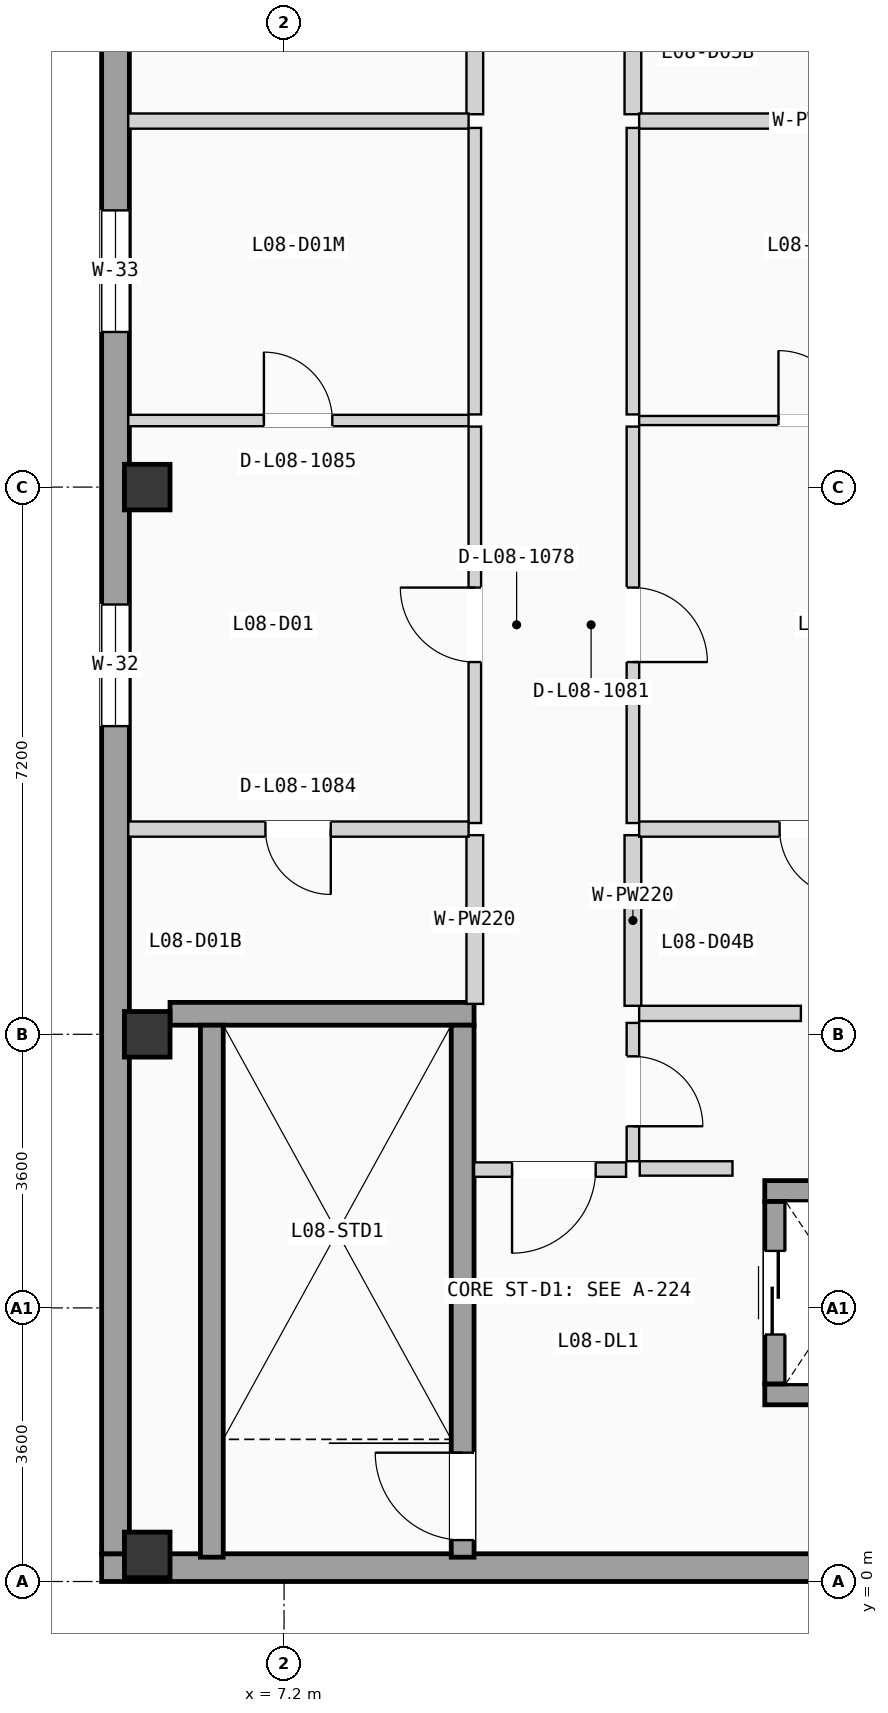
"""IFC4 building model, lengths in metres.
Left out: names, types, materials, properties, quantities, classifications, styles, units other than length and angle.
Written with IfcOpenShell. Run it as: python <this file> out.ifc"""

import sys

from ifc_helpers import new_model, si_unit, direction, frame, frame_2d, origin, origin_2d, place, context, subcontext, project, spatial, rectangle, extrude, element, fill, save


model = new_model("IFC4")
c1 = context("Model", 3, precision=1e-05, world=origin(), true_north=direction((0.0, 1.0)))
c2 = subcontext(c1, "Body", "Model", "MODEL_VIEW")
j1 = project(units=[si_unit("LENGTHUNIT", "METRE"), si_unit("PLANEANGLEUNIT", "RADIAN")], contexts=[c1])
p1 = place(None, origin())
s1 = spatial("IfcSite", under=j1, at=p1, CompositionType="ELEMENT")
p2 = place(p1, origin())
s2 = spatial("IfcBuilding", under=s1, at=p2, CompositionType="ELEMENT")
p3 = place(p2, frame((0.0, 0.0, 27.825)))
s3 = spatial("IfcBuildingStorey", under=s2, at=p3, CompositionType="ELEMENT", Elevation=27.825)
for number, where, z_axis, x_axis in (
    (1, (5.4, 0.35, 0.0), (0.0, 0.0, 1.0), (1.0, 0.0, 0.0)),
    (2, (5.4, 7.2, 0.0), (0.0, 0.0, 1.0), (1.0, 0.0, 0.0)),
    (3, (5.4, 14.4, 0.0), (0.0, 0.0, 1.0), (1.0, 0.0, 0.0)),
):
    element("IfcColumn", number, at=place(p3, frame(where, z_axis=z_axis, x_axis=x_axis)), inside=s3, PredefinedType="COLUMN", context=c2, shape_type="SweptSolid", body=[
        extrude(rectangle(XDim=0.6, YDim=0.6, at=origin_2d()), origin(), (0.0, 0.0, 1.0), 2.85),
    ])
p4 = place(p3, frame((4.8, 0.183, 0.0), z_axis=(0.0, 0.0, 1.0), x_axis=(1.0, 0.0, 0.0)))
e4 = element("IfcWall", 4, at=p4, inside=s3, PredefinedType="SOLIDWALL", context=c2, shape_type="SweptSolid", body=[
    extrude(rectangle(XDim=12.0, YDim=0.365, at=frame_2d((6.0, 0.0))), origin(), (0.0, 0.0, 1.0), 2.55),
])
p5 = place(p3, frame((4.982, 0.365, 0.0), z_axis=(0.0, 0.0, 1.0), x_axis=(0.0, 1.0, 0.0)))
e5 = element("IfcWall", 5, at=p5, inside=s3, PredefinedType="SOLIDWALL", context=c2, shape_type="SweptSolid", body=[
    extrude(rectangle(XDim=49.67, YDim=0.365, at=frame_2d((24.835, 0.0))), origin(), (0.0, 0.0, 1.0), 2.55),
])
p6 = place(p5, frame((10.89, 0.0, 0.75)))
e6 = element("IfcOpeningElement", 6, at=p6, cuts=e5, PredefinedType="OPENING", context=c2, shape_type="SweptSolid", body=[
    extrude(rectangle(XDim=1.6, YDim=1.35, at=frame_2d((0.8, 0.675))), frame((0.0, 0.192, 0.0), z_axis=(0.0, -1.0, 0.0), x_axis=(1.0, 0.0, 0.0)), (0.0, 0.0, 1.0), 0.385),
])
p7 = place(p5, frame((16.076, 0.0, 0.665)))
e7 = element("IfcOpeningElement", 7, at=p7, cuts=e5, PredefinedType="OPENING", context=c2, shape_type="SweptSolid", body=[
    extrude(rectangle(XDim=1.6, YDim=1.5, at=frame_2d((0.8, 0.75))), frame((0.0, 0.192, 0.0), z_axis=(0.0, -1.0, 0.0), x_axis=(1.0, 0.0, 0.0)), (0.0, 0.0, 1.0), 0.385),
])
p8 = place(p5, frame((23.352, 0.0, 0.515)))
e8 = element("IfcOpeningElement", 8, at=p8, cuts=e5, PredefinedType="OPENING", context=c2, shape_type="SweptSolid", body=[
    extrude(rectangle(XDim=1.6, YDim=1.65, at=frame_2d((0.8, 0.825))), frame((0.0, 0.192, 0.0), z_axis=(0.0, -1.0, 0.0), x_axis=(1.0, 0.0, 0.0)), (0.0, 0.0, 1.0), 0.385),
])
p9 = place(p5, frame((36.73, 0.0, 0.85)))
e9 = element("IfcOpeningElement", 9, at=p9, cuts=e5, PredefinedType="OPENING", context=c2, shape_type="SweptSolid", body=[
    extrude(rectangle(XDim=0.95, YDim=1.2, at=frame_2d((0.475, 0.6))), frame((0.0, 0.192, 0.0), z_axis=(0.0, -1.0, 0.0), x_axis=(1.0, 0.0, 0.0)), (0.0, 0.0, 1.0), 0.385),
])
p10 = place(p5, frame((39.69, 0.0, 0.75)))
e10 = element("IfcOpeningElement", 10, at=p10, cuts=e5, PredefinedType="OPENING", context=c2, shape_type="SweptSolid", body=[
    extrude(rectangle(XDim=1.72, YDim=1.2, at=frame_2d((0.86, 0.6))), frame((0.0, 0.192, 0.0), z_axis=(0.0, -1.0, 0.0), x_axis=(1.0, 0.0, 0.0)), (0.0, 0.0, 1.0), 0.385),
])
p11 = place(p3, frame((5.7, 7.47, 0.0), z_axis=(0.0, 0.0, 1.0), x_axis=(1.0, 0.0, 0.0)))
e11 = element("IfcWall", 11, at=p11, inside=s3, PredefinedType="SHEAR", context=c2, shape_type="SweptSolid", body=[
    extrude(rectangle(XDim=4.0, YDim=0.3, at=frame_2d((2.0, 0.0))), origin(), (0.0, 0.0, 1.0), 2.55),
])
p12 = place(p3, frame((6.25, 0.32, 0.0), z_axis=(0.0, 0.0, 1.0), x_axis=(0.0, 1.0, 0.0)))
e12 = element("IfcWall", 12, at=p12, inside=s3, PredefinedType="SHEAR", context=c2, shape_type="SweptSolid", body=[
    extrude(rectangle(XDim=7.0, YDim=0.3, at=frame_2d((3.5, 0.0))), origin(), (0.0, 0.0, 1.0), 2.55),
])
p13 = place(p3, frame((9.55, 0.32, 0.0), z_axis=(0.0, 0.0, 1.0), x_axis=(0.0, 1.0, 0.0)))
e13 = element("IfcWall", 13, at=p13, inside=s3, PredefinedType="SHEAR", context=c2, shape_type="SweptSolid", body=[
    extrude(rectangle(XDim=7.0, YDim=0.3, at=frame_2d((3.5, 0.0))), origin(), (0.0, 0.0, 1.0), 2.55),
])
p14 = place(p13, frame((0.225, 0.0, 0.0)))
e14 = element("IfcOpeningElement", 14, at=p14, cuts=e13, PredefinedType="OPENING", context=c2, shape_type="SweptSolid", body=[
    extrude(rectangle(XDim=1.15, YDim=2.12, at=frame_2d((0.575, 1.06))), frame((0.0, 0.16, 0.0), z_axis=(0.0, -1.0, 0.0), x_axis=(1.0, 0.0, 0.0)), (0.0, 0.0, 1.0), 0.32),
])
for number, where, z_axis, x_axis in (
    (15, (13.525, 2.462, 0.0), (0.0, 0.0, 1.0), (1.0, 0.0, 0.0)),
    (16, (13.525, 5.137, 0.0), (0.0, 0.0, 1.0), (1.0, 0.0, 0.0)),
):
    element("IfcWall", number, at=place(p3, frame(where, z_axis=z_axis, x_axis=x_axis)), inside=s3, PredefinedType="SHEAR", context=c2, shape_type="SweptSolid", body=[
        extrude(rectangle(XDim=2.15, YDim=0.275, at=frame_2d((1.075, 0.0))), origin(), (0.0, 0.0, 1.0), 2.55),
    ])
p15 = place(p3, frame((13.663, 2.6, 0.0), z_axis=(0.0, 0.0, 1.0), x_axis=(0.0, 1.0, 0.0)))
e17 = element("IfcWall", 17, at=p15, inside=s3, PredefinedType="SHEAR", context=c2, shape_type="SweptSolid", body=[
    extrude(rectangle(XDim=2.4, YDim=0.275, at=frame_2d((1.2, 0.0))), origin(), (0.0, 0.0, 1.0), 2.55),
])
p16 = place(p15, frame((0.65, 0.0, 0.0)))
e18 = element("IfcOpeningElement", 18, at=p16, cuts=e17, PredefinedType="OPENING", context=c2, shape_type="SweptSolid", body=[
    extrude(rectangle(XDim=1.1, YDim=2.15, at=frame_2d((0.55, 1.075))), frame((0.0, 0.147, 0.0), z_axis=(0.0, -1.0, 0.0), x_axis=(1.0, 0.0, 0.0)), (0.0, 0.0, 1.0), 0.295),
])
p17 = place(p3, frame((11.88, 5.435, 0.0), z_axis=(0.0, 0.0, 1.0), x_axis=(1.0, 0.0, 0.0)))
e19 = element("IfcWall", 19, at=p17, inside=s3, PredefinedType="PARTITIONING", context=c2, shape_type="SweptSolid", body=[
    extrude(rectangle(XDim=1.22, YDim=0.19, at=frame_2d((0.61, 0.0))), origin(), (0.0, 0.0, 1.0), 2.39),
])
p18 = place(p3, frame((9.7, 5.42, 0.0), z_axis=(0.0, 0.0, 1.0), x_axis=(1.0, 0.0, 0.0)))
e20 = element("IfcWall", 20, at=p18, inside=s3, PredefinedType="PARTITIONING", context=c2, shape_type="SweptSolid", body=[
    extrude(rectangle(XDim=2.0, YDim=0.19, at=frame_2d((1.0, 0.0))), origin(), (0.0, 0.0, 1.0), 2.39),
])
p19 = place(p18, frame((0.5, 0.0, 0.0)))
e21 = element("IfcOpeningElement", 21, at=p19, cuts=e20, PredefinedType="OPENING", context=c2, shape_type="SweptSolid", body=[
    extrude(rectangle(XDim=1.1, YDim=2.12, at=frame_2d((0.55, 1.06))), frame((0.0, 0.105, 0.0), z_axis=(0.0, -1.0, 0.0), x_axis=(1.0, 0.0, 0.0)), (0.0, 0.0, 1.0), 0.21),
])
p20 = place(p3, frame((11.79, 5.53, 0.0), z_axis=(0.0, 0.0, 1.0), x_axis=(0.0, 1.0, 0.0)))
e22 = element("IfcWall", 22, at=p20, inside=s3, PredefinedType="PARTITIONING", context=c2, shape_type="SweptSolid", body=[
    extrude(rectangle(XDim=1.82, YDim=0.165, at=frame_2d((0.91, 0.0))), origin(), (0.0, 0.0, 1.0), 2.39),
])
p21 = place(p20, frame((0.46, 0.0, 0.0)))
e23 = element("IfcOpeningElement", 23, at=p21, cuts=e22, PredefinedType="OPENING", context=c2, shape_type="SweptSolid", body=[
    extrude(rectangle(XDim=0.92, YDim=2.04, at=frame_2d((0.46, 1.02))), frame((0.0, 0.093, 0.0), z_axis=(0.0, -1.0, 0.0), x_axis=(1.0, 0.0, 0.0)), (0.0, 0.0, 1.0), 0.185),
])
p22 = place(p3, frame((11.872, 7.475, 0.0), z_axis=(0.0, 0.0, 1.0), x_axis=(1.0, 0.0, 0.0)))
e24 = element("IfcWall", 24, at=p22, inside=s3, PredefinedType="PLUMBINGWALL", context=c2, shape_type="SweptSolid", body=[
    extrude(rectangle(XDim=2.128, YDim=0.2, at=frame_2d((1.064, 0.0))), origin(), (0.0, 0.0, 1.0), 2.12),
])
p23 = place(p3, frame((9.71, 7.6, 0.0), z_axis=(0.0, 0.0, 1.0), x_axis=(0.0, 1.0, 0.0)))
e25 = element("IfcWall", 25, at=p23, inside=s3, PredefinedType="PLUMBINGWALL", context=c2, shape_type="SweptSolid", body=[
    extrude(rectangle(XDim=2.22, YDim=0.22, at=frame_2d((1.11, 0.0))), origin(), (0.0, 0.0, 1.0), 2.39),
])
p24 = place(p3, frame((9.71, 9.98, 0.0), z_axis=(0.0, 0.0, 1.0), x_axis=(0.0, 1.0, 0.0)))
e26 = element("IfcWall", 26, at=p24, inside=s3, PredefinedType="PARTITIONING", context=c2, shape_type="SweptSolid", body=[
    extrude(rectangle(XDim=5.216, YDim=0.165, at=frame_2d((2.608, 0.0))), origin(), (0.0, 0.0, 1.0), 2.39),
])
p25 = place(p24, frame((2.118, 0.0, 0.0)))
e27 = element("IfcOpeningElement", 27, at=p25, cuts=e26, PredefinedType="OPENING", context=c2, shape_type="SweptSolid", body=[
    extrude(rectangle(XDim=0.98, YDim=2.08, at=frame_2d((0.49, 1.04))), frame((0.0, 0.093, 0.0), z_axis=(0.0, -1.0, 0.0), x_axis=(1.0, 0.0, 0.0)), (0.0, 0.0, 1.0), 0.185),
])
p26 = place(p3, frame((9.71, 15.356, 0.0), z_axis=(0.0, 0.0, 1.0), x_axis=(0.0, 1.0, 0.0)))
e28 = element("IfcWall", 28, at=p26, inside=s3, PredefinedType="PARTITIONING", context=c2, shape_type="SweptSolid", body=[
    extrude(rectangle(XDim=3.77, YDim=0.165, at=frame_2d((1.885, 0.0))), origin(), (0.0, 0.0, 1.0), 2.39),
])
p27 = place(p3, frame((9.71, 19.306, 0.0), z_axis=(0.0, 0.0, 1.0), x_axis=(0.0, 1.0, 0.0)))
e29 = element("IfcWall", 29, at=p27, inside=s3, PredefinedType="PLUMBINGWALL", context=c2, shape_type="SweptSolid", body=[
    extrude(rectangle(XDim=2.22, YDim=0.22, at=frame_2d((1.11, 0.0))), origin(), (0.0, 0.0, 1.0), 2.39),
])
p28 = place(p3, frame((11.79, 7.575, 0.0), z_axis=(0.0, 0.0, 1.0), x_axis=(0.0, 1.0, 0.0)))
e30 = element("IfcWall", 30, at=p28, inside=s3, PredefinedType="PLUMBINGWALL", context=c2, shape_type="SweptSolid", body=[
    extrude(rectangle(XDim=2.245, YDim=0.22, at=frame_2d((1.123, 0.0))), origin(), (0.0, 0.0, 1.0), 2.39),
])
p29 = place(p3, frame((11.79, 9.98, 0.0), z_axis=(0.0, 0.0, 1.0), x_axis=(0.0, 1.0, 0.0)))
e31 = element("IfcWall", 31, at=p29, inside=s3, PredefinedType="PARTITIONING", context=c2, shape_type="SweptSolid", body=[
    extrude(rectangle(XDim=5.216, YDim=0.165, at=frame_2d((2.608, 0.0))), origin(), (0.0, 0.0, 1.0), 2.39),
])
p30 = place(p29, frame((2.118, 0.0, 0.0)))
e32 = element("IfcOpeningElement", 32, at=p30, cuts=e31, PredefinedType="OPENING", context=c2, shape_type="SweptSolid", body=[
    extrude(rectangle(XDim=0.98, YDim=2.08, at=frame_2d((0.49, 1.04))), frame((0.0, 0.093, 0.0), z_axis=(0.0, -1.0, 0.0), x_axis=(1.0, 0.0, 0.0)), (0.0, 0.0, 1.0), 0.185),
])
p31 = place(p3, frame((11.79, 15.356, 0.0), z_axis=(0.0, 0.0, 1.0), x_axis=(0.0, 1.0, 0.0)))
e33 = element("IfcWall", 33, at=p31, inside=s3, PredefinedType="PARTITIONING", context=c2, shape_type="SweptSolid", body=[
    extrude(rectangle(XDim=3.77, YDim=0.165, at=frame_2d((1.885, 0.0))), origin(), (0.0, 0.0, 1.0), 2.39),
])
p32 = place(p3, frame((11.79, 19.306, 0.0), z_axis=(0.0, 0.0, 1.0), x_axis=(0.0, 1.0, 0.0)))
e34 = element("IfcWall", 34, at=p32, inside=s3, PredefinedType="PLUMBINGWALL", context=c2, shape_type="SweptSolid", body=[
    extrude(rectangle(XDim=2.22, YDim=0.22, at=frame_2d((1.11, 0.0))), origin(), (0.0, 0.0, 1.0), 2.39),
])
p33 = place(p3, frame((5.15, 9.9, 0.0), z_axis=(0.0, 0.0, 1.0), x_axis=(1.0, 0.0, 0.0)))
e35 = element("IfcWall", 35, at=p33, inside=s3, PredefinedType="PLUMBINGWALL", context=c2, shape_type="SweptSolid", body=[
    extrude(rectangle(XDim=4.478, YDim=0.2, at=frame_2d((2.239, 0.0))), origin(), (0.0, 0.0, 1.0), 2.39),
])
p34 = place(p33, frame((1.805, 0.0, 0.0)))
e36 = element("IfcOpeningElement", 36, at=p34, cuts=e35, PredefinedType="OPENING", context=c2, shape_type="SweptSolid", body=[
    extrude(rectangle(XDim=0.86, YDim=2.0, at=frame_2d((0.43, 1.0))), frame((0.0, 0.11, 0.0), z_axis=(0.0, -1.0, 0.0), x_axis=(1.0, 0.0, 0.0)), (0.0, 0.0, 1.0), 0.22),
])
p35 = place(p3, frame((5.15, 15.276, 0.0), z_axis=(0.0, 0.0, 1.0), x_axis=(1.0, 0.0, 0.0)))
e37 = element("IfcWall", 37, at=p35, inside=s3, PredefinedType="PARTITIONING", context=c2, shape_type="SweptSolid", body=[
    extrude(rectangle(XDim=4.478, YDim=0.15, at=frame_2d((2.239, 0.0))), origin(), (0.0, 0.0, 1.0), 2.39),
])
p36 = place(p35, frame((1.785, 0.0, 0.0)))
e38 = element("IfcOpeningElement", 38, at=p36, cuts=e37, PredefinedType="OPENING", context=c2, shape_type="SweptSolid", body=[
    extrude(rectangle(XDim=0.9, YDim=2.04, at=frame_2d((0.45, 1.02))), frame((0.0, 0.085, 0.0), z_axis=(0.0, -1.0, 0.0), x_axis=(1.0, 0.0, 0.0)), (0.0, 0.0, 1.0), 0.17),
])
p37 = place(p3, frame((5.15, 19.216, 0.0), z_axis=(0.0, 0.0, 1.0), x_axis=(1.0, 0.0, 0.0)))
e39 = element("IfcWall", 39, at=p37, inside=s3, PredefinedType="PLUMBINGWALL", context=c2, shape_type="SweptSolid", body=[
    extrude(rectangle(XDim=4.478, YDim=0.2, at=frame_2d((2.239, 0.0))), origin(), (0.0, 0.0, 1.0), 2.39),
])
p38 = place(p3, frame((11.872, 9.9, 0.0), z_axis=(0.0, 0.0, 1.0), x_axis=(1.0, 0.0, 0.0)))
e40 = element("IfcWall", 40, at=p38, inside=s3, PredefinedType="PLUMBINGWALL", context=c2, shape_type="SweptSolid", body=[
    extrude(rectangle(XDim=4.578, YDim=0.2, at=frame_2d((2.289, 0.0))), origin(), (0.0, 0.0, 1.0), 2.39),
])
p39 = place(p38, frame((1.848, 0.0, 0.0)))
e41 = element("IfcOpeningElement", 41, at=p39, cuts=e40, PredefinedType="OPENING", context=c2, shape_type="SweptSolid", body=[
    extrude(rectangle(XDim=0.89, YDim=2.03, at=frame_2d((0.445, 1.015))), frame((0.0, 0.11, 0.0), z_axis=(0.0, -1.0, 0.0), x_axis=(1.0, 0.0, 0.0)), (0.0, 0.0, 1.0), 0.22),
])
p40 = place(p3, frame((11.872, 15.276, 0.0), z_axis=(0.0, 0.0, 1.0), x_axis=(1.0, 0.0, 0.0)))
e42 = element("IfcWall", 42, at=p40, inside=s3, PredefinedType="PARTITIONING", context=c2, shape_type="SweptSolid", body=[
    extrude(rectangle(XDim=4.578, YDim=0.12, at=frame_2d((2.289, 0.0))), origin(), (0.0, 0.0, 1.0), 2.39),
])
p41 = place(p40, frame((1.833, 0.0, 0.0)))
e43 = element("IfcOpeningElement", 43, at=p41, cuts=e42, PredefinedType="OPENING", context=c2, shape_type="SweptSolid", body=[
    extrude(rectangle(XDim=0.92, YDim=2.02, at=frame_2d((0.46, 1.01))), frame((0.0, 0.07, 0.0), z_axis=(0.0, -1.0, 0.0), x_axis=(1.0, 0.0, 0.0)), (0.0, 0.0, 1.0), 0.14),
])
p42 = place(p3, frame((11.872, 19.216, 0.0), z_axis=(0.0, 0.0, 1.0), x_axis=(1.0, 0.0, 0.0)))
e44 = element("IfcWall", 44, at=p42, inside=s3, PredefinedType="PLUMBINGWALL", context=c2, shape_type="SweptSolid", body=[
    extrude(rectangle(XDim=4.578, YDim=0.2, at=frame_2d((2.289, 0.0))), origin(), (0.0, 0.0, 1.0), 2.39),
])
p43 = place(p6, origin())
e45 = element("IfcWindow", 45, at=p43, inside=s3, PartitioningType="DOUBLE_PANEL_VERTICAL", PredefinedType="WINDOW", context=c2, shape_type="SweptSolid", body=[
    extrude(rectangle(XDim=1.6, YDim=1.35, at=frame_2d((0.8, 0.675))), frame((0.0, 0.03, 0.0), z_axis=(0.0, -1.0, 0.0), x_axis=(1.0, 0.0, 0.0)), (0.0, 0.0, 1.0), 0.06),
])
fill(e6, e45)
p44 = place(p7, origin())
e46 = element("IfcWindow", 46, at=p44, inside=s3, PartitioningType="DOUBLE_PANEL_VERTICAL", PredefinedType="WINDOW", context=c2, shape_type="SweptSolid", body=[
    extrude(rectangle(XDim=1.6, YDim=1.5, at=frame_2d((0.8, 0.75))), frame((0.0, 0.03, 0.0), z_axis=(0.0, -1.0, 0.0), x_axis=(1.0, 0.0, 0.0)), (0.0, 0.0, 1.0), 0.06),
])
fill(e7, e46)
p45 = place(p14, origin())
e47 = element("IfcDoor", 47, at=p45, inside=s3, OperationType="SINGLE_SWING_RIGHT", PredefinedType="DOOR", context=c2, shape_type="SweptSolid", body=[
    extrude(rectangle(XDim=1.15, YDim=2.12, at=frame_2d((0.575, 1.06))), frame((0.0, 0.025, 0.0), z_axis=(0.0, -1.0, 0.0), x_axis=(1.0, 0.0, 0.0)), (0.0, 0.0, 1.0), 0.05),
])
fill(e14, e47)
p46 = place(p16, origin())
e48 = element("IfcDoor", 48, at=p46, inside=s3, OperationType="SLIDING_TO_LEFT", PredefinedType="DOOR", context=c2, shape_type="SweptSolid", body=[
    extrude(rectangle(XDim=1.1, YDim=2.15, at=frame_2d((0.55, 1.075))), frame((0.0, 0.025, 0.0), z_axis=(0.0, -1.0, 0.0), x_axis=(1.0, 0.0, 0.0)), (0.0, 0.0, 1.0), 0.05),
])
fill(e18, e48)
p47 = place(p19, frame((1.1, 0.0, 0.0), z_axis=(0.0, 0.0, 1.0), x_axis=(-1.0, 0.0, 0.0)))
e49 = element("IfcDoor", 49, at=p47, inside=s3, OperationType="SINGLE_SWING_LEFT", PredefinedType="DOOR", context=c2, shape_type="SweptSolid", body=[
    extrude(rectangle(XDim=1.1, YDim=2.12, at=frame_2d((0.55, 1.06))), frame((0.0, 0.025, 0.0), z_axis=(0.0, -1.0, 0.0), x_axis=(1.0, 0.0, 0.0)), (0.0, 0.0, 1.0), 0.05),
])
fill(e21, e49)
p48 = place(p21, frame((0.92, 0.0, 0.0), z_axis=(0.0, 0.0, 1.0), x_axis=(-1.0, 0.0, 0.0)))
e50 = element("IfcDoor", 50, at=p48, inside=s3, OperationType="SINGLE_SWING_LEFT", PredefinedType="DOOR", context=c2, shape_type="SweptSolid", body=[
    extrude(rectangle(XDim=0.92, YDim=2.04, at=frame_2d((0.46, 1.02))), frame((0.0, 0.025, 0.0), z_axis=(0.0, -1.0, 0.0), x_axis=(1.0, 0.0, 0.0)), (0.0, 0.0, 1.0), 0.05),
])
fill(e23, e50)
p49 = place(p25, origin())
e51 = element("IfcDoor", 51, at=p49, inside=s3, OperationType="SINGLE_SWING_RIGHT", PredefinedType="DOOR", context=c2, shape_type="SweptSolid", body=[
    extrude(rectangle(XDim=0.98, YDim=2.08, at=frame_2d((0.49, 1.04))), frame((0.0, 0.025, 0.0), z_axis=(0.0, -1.0, 0.0), x_axis=(1.0, 0.0, 0.0)), (0.0, 0.0, 1.0), 0.05),
])
fill(e27, e51)
p50 = place(p30, frame((0.98, 0.0, 0.0), z_axis=(0.0, 0.0, 1.0), x_axis=(-1.0, 0.0, 0.0)))
e52 = element("IfcDoor", 52, at=p50, inside=s3, OperationType="SINGLE_SWING_LEFT", PredefinedType="DOOR", context=c2, shape_type="SweptSolid", body=[
    extrude(rectangle(XDim=0.98, YDim=2.08, at=frame_2d((0.49, 1.04))), frame((0.0, 0.025, 0.0), z_axis=(0.0, -1.0, 0.0), x_axis=(1.0, 0.0, 0.0)), (0.0, 0.0, 1.0), 0.05),
])
fill(e32, e52)
p51 = place(p34, frame((0.86, 0.0, 0.0), z_axis=(0.0, 0.0, 1.0), x_axis=(-1.0, 0.0, 0.0)))
e53 = element("IfcDoor", 53, at=p51, inside=s3, OperationType="SINGLE_SWING_RIGHT", PredefinedType="DOOR", context=c2, shape_type="SweptSolid", body=[
    extrude(rectangle(XDim=0.86, YDim=2.0, at=frame_2d((0.43, 1.0))), frame((0.0, 0.025, 0.0), z_axis=(0.0, -1.0, 0.0), x_axis=(1.0, 0.0, 0.0)), (0.0, 0.0, 1.0), 0.05),
])
fill(e36, e53)
p52 = place(p36, origin())
e54 = element("IfcDoor", 54, at=p52, inside=s3, OperationType="SINGLE_SWING_LEFT", PredefinedType="DOOR", context=c2, shape_type="SweptSolid", body=[
    extrude(rectangle(XDim=0.9, YDim=2.04, at=frame_2d((0.45, 1.02))), frame((0.0, 0.025, 0.0), z_axis=(0.0, -1.0, 0.0), x_axis=(1.0, 0.0, 0.0)), (0.0, 0.0, 1.0), 0.05),
])
fill(e38, e54)
p53 = place(p39, frame((0.89, 0.0, 0.0), z_axis=(0.0, 0.0, 1.0), x_axis=(-1.0, 0.0, 0.0)))
e55 = element("IfcDoor", 55, at=p53, inside=s3, OperationType="SINGLE_SWING_RIGHT", PredefinedType="DOOR", context=c2, shape_type="SweptSolid", body=[
    extrude(rectangle(XDim=0.89, YDim=2.03, at=frame_2d((0.445, 1.015))), frame((0.0, 0.025, 0.0), z_axis=(0.0, -1.0, 0.0), x_axis=(1.0, 0.0, 0.0)), (0.0, 0.0, 1.0), 0.05),
])
fill(e41, e55)
p54 = place(p41, origin())
e56 = element("IfcDoor", 56, at=p54, inside=s3, OperationType="SINGLE_SWING_LEFT", PredefinedType="DOOR", context=c2, shape_type="SweptSolid", body=[
    extrude(rectangle(XDim=0.92, YDim=2.02, at=frame_2d((0.46, 1.01))), frame((0.0, 0.025, 0.0), z_axis=(0.0, -1.0, 0.0), x_axis=(1.0, 0.0, 0.0)), (0.0, 0.0, 1.0), 0.05),
])
fill(e43, e56)
save(model, sys.argv[1])
